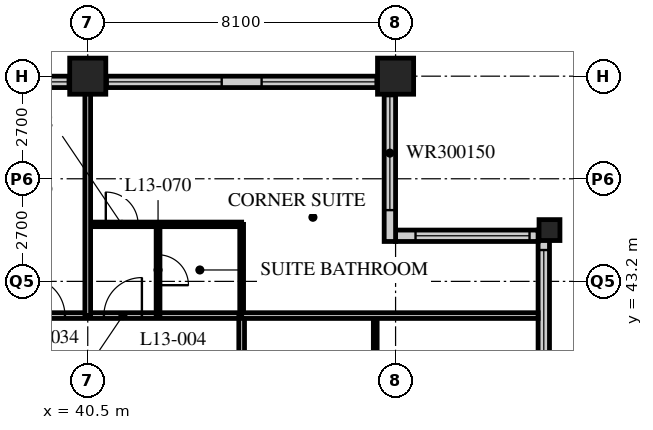
"""IFC4 building model, lengths in metres.
Left out: names, types, materials, properties, quantities, classifications, styles, units other than length and angle.
Written with IfcOpenShell. Run it as: python <this file> out.ifc"""

import sys

from ifc_helpers import new_model, si_unit, direction, frame, frame_2d, origin, origin_2d, place, context, subcontext, project, spatial, rectangle, hollow_rectangle, extrude, element, fill, save


model = new_model("IFC4")
c1 = context("Model", 3, precision=1e-05, world=origin(), true_north=direction((0.0, 1.0)))
c2 = subcontext(c1, "Body", "Model", "MODEL_VIEW")
j1 = project(units=[si_unit("LENGTHUNIT", "METRE"), si_unit("PLANEANGLEUNIT", "RADIAN")], contexts=[c1])
p1 = place(None, origin())
s1 = spatial("IfcSite", under=j1, at=p1, CompositionType="ELEMENT")
p2 = place(p1, origin())
s2 = spatial("IfcBuilding", under=s1, at=p2, CompositionType="ELEMENT")
p3 = place(p2, frame((0.0, 0.0, 56.8)))
s3 = spatial("IfcBuildingStorey", under=s2, at=p3, CompositionType="ELEMENT", Elevation=56.8)
for number, where, z_axis, x_axis in (
    (1, (40.5, 48.6, 0.0), (0.0, 0.0, 1.0), (1.0, 0.0, 0.0)),
    (2, (48.6, 48.6, 0.0), (0.0, 0.0, 1.0), (1.0, 0.0, 0.0)),
):
    element("IfcColumn", number, at=place(p3, frame(where, z_axis=z_axis, x_axis=x_axis)), inside=s3, PredefinedType="COLUMN", context=c2, shape_type="SweptSolid", body=[
        extrude(hollow_rectangle(XDim=0.95, YDim=0.95, WallThickness=0.095, at=origin_2d()), origin(), (0.0, 0.0, 1.0), 3.4),
    ])
p4 = place(p3, frame((52.65, 44.55, 0.0), z_axis=(0.0, 0.0, 1.0), x_axis=(1.0, 0.0, 0.0)))
e3 = element("IfcColumn", 3, at=p4, inside=s3, PredefinedType="COLUMN", context=c2, shape_type="SweptSolid", body=[
    extrude(hollow_rectangle(XDim=0.55, YDim=0.55, WallThickness=0.05, at=origin_2d()), origin(), (0.0, 0.0, 1.0), 3.4),
])
p5 = place(p3, frame((52.5, 40.2, 0.0), z_axis=(0.0, 0.0, 1.0), x_axis=(0.0, 1.0, 0.0)))
e4 = element("IfcWall", 4, at=p5, inside=s3, PredefinedType="SOLIDWALL", context=c2, shape_type="SweptSolid", body=[
    extrude(rectangle(XDim=4.35, YDim=0.3, at=frame_2d((2.175, 0.0))), origin(), (0.0, 0.0, 1.0), 3.19),
])
p6 = place(p5, frame((0.825, 0.0, 0.9)))
e5 = element("IfcOpeningElement", 5, at=p6, cuts=e4, PredefinedType="OPENING", context=c2, shape_type="SweptSolid", body=[
    extrude(rectangle(XDim=3.0, YDim=1.5, at=frame_2d((1.5, 0.75))), frame((0.0, 0.16, 0.0), z_axis=(0.0, -1.0, 0.0), x_axis=(1.0, 0.0, 0.0)), (0.0, 0.0, 1.0), 0.32),
])
p7 = place(p3, frame((52.35, 44.4, 0.0), z_axis=(0.0, 0.0, 1.0), x_axis=(-1.0, 0.0, 0.0)))
e6 = element("IfcWall", 6, at=p7, inside=s3, PredefinedType="SOLIDWALL", context=c2, shape_type="SweptSolid", body=[
    extrude(rectangle(XDim=3.75, YDim=0.3, at=frame_2d((1.875, 0.0))), origin(), (0.0, 0.0, 1.0), 3.19),
])
p8 = place(p7, frame((0.225, 0.0, 0.9)))
e7 = element("IfcOpeningElement", 7, at=p8, cuts=e6, PredefinedType="OPENING", context=c2, shape_type="SweptSolid", body=[
    extrude(rectangle(XDim=3.0, YDim=1.5, at=frame_2d((1.5, 0.75))), frame((0.0, 0.16, 0.0), z_axis=(0.0, -1.0, 0.0), x_axis=(1.0, 0.0, 0.0)), (0.0, 0.0, 1.0), 0.32),
])
p9 = place(p3, frame((48.45, 44.25, 0.0), z_axis=(0.0, 0.0, 1.0), x_axis=(0.0, 1.0, 0.0)))
e8 = element("IfcWall", 8, at=p9, inside=s3, PredefinedType="SOLIDWALL", context=c2, shape_type="SweptSolid", body=[
    extrude(rectangle(XDim=4.35, YDim=0.3, at=frame_2d((2.175, 0.0))), origin(), (0.0, 0.0, 1.0), 3.19),
])
p10 = place(p9, frame((0.825, 0.0, 0.9)))
e9 = element("IfcOpeningElement", 9, at=p10, cuts=e8, PredefinedType="OPENING", context=c2, shape_type="SweptSolid", body=[
    extrude(rectangle(XDim=3.0, YDim=1.5, at=frame_2d((1.5, 0.75))), frame((0.0, 0.16, 0.0), z_axis=(0.0, -1.0, 0.0), x_axis=(1.0, 0.0, 0.0)), (0.0, 0.0, 1.0), 0.32),
])
p11 = place(p3, frame((48.3, 48.45, 0.0), z_axis=(0.0, 0.0, 1.0), x_axis=(-1.0, 0.0, 0.0)))
e10 = element("IfcWall", 10, at=p11, inside=s3, PredefinedType="SOLIDWALL", context=c2, shape_type="SweptSolid", body=[
    extrude(rectangle(XDim=40.2, YDim=0.3, at=frame_2d((20.1, 0.0))), origin(), (0.0, 0.0, 1.0), 3.19),
])
p12 = place(p11, frame((0.225, 0.0, 0.9)))
e11 = element("IfcOpeningElement", 11, at=p12, cuts=e10, PredefinedType="OPENING", context=c2, shape_type="SweptSolid", body=[
    extrude(rectangle(XDim=3.0, YDim=2.0, at=frame_2d((1.5, 1.0))), frame((0.0, 0.16, 0.0), z_axis=(0.0, -1.0, 0.0), x_axis=(1.0, 0.0, 0.0)), (0.0, 0.0, 1.0), 0.32),
])
p13 = place(p11, frame((4.275, 0.0, 0.9)))
e12 = element("IfcOpeningElement", 12, at=p13, cuts=e10, PredefinedType="OPENING", context=c2, shape_type="SweptSolid", body=[
    extrude(rectangle(XDim=3.0, YDim=2.0, at=frame_2d((1.5, 1.0))), frame((0.0, 0.16, 0.0), z_axis=(0.0, -1.0, 0.0), x_axis=(1.0, 0.0, 0.0)), (0.0, 0.0, 1.0), 0.32),
])
p14 = place(p11, frame((8.325, 0.0, 0.9)))
e13 = element("IfcOpeningElement", 13, at=p14, cuts=e10, PredefinedType="OPENING", context=c2, shape_type="SweptSolid", body=[
    extrude(rectangle(XDim=3.0, YDim=2.0, at=frame_2d((1.5, 1.0))), frame((0.0, 0.16, 0.0), z_axis=(0.0, -1.0, 0.0), x_axis=(1.0, 0.0, 0.0)), (0.0, 0.0, 1.0), 0.32),
])
p15 = place(p11, frame((12.375, 0.0, 0.9)))
e14 = element("IfcOpeningElement", 14, at=p15, cuts=e10, PredefinedType="OPENING", context=c2, shape_type="SweptSolid", body=[
    extrude(rectangle(XDim=3.0, YDim=2.0, at=frame_2d((1.5, 1.0))), frame((0.0, 0.16, 0.0), z_axis=(0.0, -1.0, 0.0), x_axis=(1.0, 0.0, 0.0)), (0.0, 0.0, 1.0), 0.32),
])
p16 = place(p11, frame((16.425, 0.0, 0.9)))
e15 = element("IfcOpeningElement", 15, at=p16, cuts=e10, PredefinedType="OPENING", context=c2, shape_type="SweptSolid", body=[
    extrude(rectangle(XDim=3.0, YDim=2.0, at=frame_2d((1.5, 1.0))), frame((0.0, 0.16, 0.0), z_axis=(0.0, -1.0, 0.0), x_axis=(1.0, 0.0, 0.0)), (0.0, 0.0, 1.0), 0.32),
])
p17 = place(p11, frame((20.475, 0.0, 0.9)))
e16 = element("IfcOpeningElement", 16, at=p17, cuts=e10, PredefinedType="OPENING", context=c2, shape_type="SweptSolid", body=[
    extrude(rectangle(XDim=3.0, YDim=2.0, at=frame_2d((1.5, 1.0))), frame((0.0, 0.16, 0.0), z_axis=(0.0, -1.0, 0.0), x_axis=(1.0, 0.0, 0.0)), (0.0, 0.0, 1.0), 0.32),
])
p18 = place(p11, frame((24.525, 0.0, 0.9)))
e17 = element("IfcOpeningElement", 17, at=p18, cuts=e10, PredefinedType="OPENING", context=c2, shape_type="SweptSolid", body=[
    extrude(rectangle(XDim=3.0, YDim=2.0, at=frame_2d((1.5, 1.0))), frame((0.0, 0.16, 0.0), z_axis=(0.0, -1.0, 0.0), x_axis=(1.0, 0.0, 0.0)), (0.0, 0.0, 1.0), 0.32),
])
p19 = place(p11, frame((28.575, 0.0, 0.9)))
e18 = element("IfcOpeningElement", 18, at=p19, cuts=e10, PredefinedType="OPENING", context=c2, shape_type="SweptSolid", body=[
    extrude(rectangle(XDim=3.0, YDim=2.0, at=frame_2d((1.5, 1.0))), frame((0.0, 0.16, 0.0), z_axis=(0.0, -1.0, 0.0), x_axis=(1.0, 0.0, 0.0)), (0.0, 0.0, 1.0), 0.32),
])
p20 = place(p11, frame((32.625, 0.0, 0.9)))
e19 = element("IfcOpeningElement", 19, at=p20, cuts=e10, PredefinedType="OPENING", context=c2, shape_type="SweptSolid", body=[
    extrude(rectangle(XDim=3.0, YDim=2.0, at=frame_2d((1.5, 1.0))), frame((0.0, 0.16, 0.0), z_axis=(0.0, -1.0, 0.0), x_axis=(1.0, 0.0, 0.0)), (0.0, 0.0, 1.0), 0.32),
])
p21 = place(p11, frame((36.675, 0.0, 0.9)))
e20 = element("IfcOpeningElement", 20, at=p21, cuts=e10, PredefinedType="OPENING", context=c2, shape_type="SweptSolid", body=[
    extrude(rectangle(XDim=3.0, YDim=2.0, at=frame_2d((1.5, 1.0))), frame((0.0, 0.16, 0.0), z_axis=(0.0, -1.0, 0.0), x_axis=(1.0, 0.0, 0.0)), (0.0, 0.0, 1.0), 0.32),
])
p22 = place(p3, frame((12.15, 42.3, 0.0), z_axis=(0.0, 0.0, 1.0), x_axis=(1.0, 0.0, 0.0)))
e21 = element("IfcWall", 21, at=p22, inside=s3, PredefinedType="PARTITIONING", context=c2, shape_type="SweptSolid", body=[
    extrude(rectangle(XDim=32.4, YDim=0.15, at=frame_2d((16.2, 0.0))), origin(), (0.0, 0.0, 1.0), 3.19),
])
p23 = place(p22, frame((6.5, 0.0, 0.0)))
e22 = element("IfcOpeningElement", 22, at=p23, cuts=e21, PredefinedType="OPENING", context=c2, shape_type="SweptSolid", body=[
    extrude(rectangle(XDim=1.0, YDim=2.1, at=frame_2d((0.5, 1.05))), frame((0.0, 0.085, 0.0), z_axis=(0.0, -1.0, 0.0), x_axis=(1.0, 0.0, 0.0)), (0.0, 0.0, 1.0), 0.17),
])
p24 = place(p22, frame((10.55, 0.0, 0.0)))
e23 = element("IfcOpeningElement", 23, at=p24, cuts=e21, PredefinedType="OPENING", context=c2, shape_type="SweptSolid", body=[
    extrude(rectangle(XDim=1.0, YDim=2.1, at=frame_2d((0.5, 1.05))), frame((0.0, 0.085, 0.0), z_axis=(0.0, -1.0, 0.0), x_axis=(1.0, 0.0, 0.0)), (0.0, 0.0, 1.0), 0.17),
])
p25 = place(p22, frame((14.6, 0.0, 0.0)))
e24 = element("IfcOpeningElement", 24, at=p25, cuts=e21, PredefinedType="OPENING", context=c2, shape_type="SweptSolid", body=[
    extrude(rectangle(XDim=1.0, YDim=2.1, at=frame_2d((0.5, 1.05))), frame((0.0, 0.085, 0.0), z_axis=(0.0, -1.0, 0.0), x_axis=(1.0, 0.0, 0.0)), (0.0, 0.0, 1.0), 0.17),
])
p26 = place(p22, frame((18.65, 0.0, 0.0)))
e25 = element("IfcOpeningElement", 25, at=p26, cuts=e21, PredefinedType="OPENING", context=c2, shape_type="SweptSolid", body=[
    extrude(rectangle(XDim=1.0, YDim=2.1, at=frame_2d((0.5, 1.05))), frame((0.0, 0.085, 0.0), z_axis=(0.0, -1.0, 0.0), x_axis=(1.0, 0.0, 0.0)), (0.0, 0.0, 1.0), 0.17),
])
p27 = place(p22, frame((22.7, 0.0, 0.0)))
e26 = element("IfcOpeningElement", 26, at=p27, cuts=e21, PredefinedType="OPENING", context=c2, shape_type="SweptSolid", body=[
    extrude(rectangle(XDim=1.0, YDim=2.1, at=frame_2d((0.5, 1.05))), frame((0.0, 0.085, 0.0), z_axis=(0.0, -1.0, 0.0), x_axis=(1.0, 0.0, 0.0)), (0.0, 0.0, 1.0), 0.17),
])
p28 = place(p22, frame((26.75, 0.0, 0.0)))
e27 = element("IfcOpeningElement", 27, at=p28, cuts=e21, PredefinedType="OPENING", context=c2, shape_type="SweptSolid", body=[
    extrude(rectangle(XDim=1.0, YDim=2.1, at=frame_2d((0.5, 1.05))), frame((0.0, 0.085, 0.0), z_axis=(0.0, -1.0, 0.0), x_axis=(1.0, 0.0, 0.0)), (0.0, 0.0, 1.0), 0.17),
])
p29 = place(p22, frame((28.775, 0.0, 0.0)))
e28 = element("IfcOpeningElement", 28, at=p29, cuts=e21, PredefinedType="OPENING", context=c2, shape_type="SweptSolid", body=[
    extrude(rectangle(XDim=1.0, YDim=2.1, at=frame_2d((0.5, 1.05))), frame((0.0, 0.085, 0.0), z_axis=(0.0, -1.0, 0.0), x_axis=(1.0, 0.0, 0.0)), (0.0, 0.0, 1.0), 0.17),
])
p30 = place(p22, frame((2.625, 0.0, 0.0)))
e29 = element("IfcOpeningElement", 29, at=p30, cuts=e21, PredefinedType="OPENING", context=c2, shape_type="SweptSolid", body=[
    extrude(rectangle(XDim=1.0, YDim=2.1, at=frame_2d((0.5, 1.05))), frame((0.0, 0.085, 0.0), z_axis=(0.0, -1.0, 0.0), x_axis=(1.0, 0.0, 0.0)), (0.0, 0.0, 1.0), 0.17),
])
p31 = place(p3, frame((44.55, 12.15, 0.0), z_axis=(0.0, 0.0, 1.0), x_axis=(0.0, 1.0, 0.0)))
e30 = element("IfcWall", 30, at=p31, inside=s3, PredefinedType="PARTITIONING", context=c2, shape_type="SweptSolid", body=[
    extrude(rectangle(XDim=30.15, YDim=0.15, at=frame_2d((15.075, 0.0))), origin(), (0.0, 0.0, 1.0), 3.19),
])
p32 = place(p31, frame((2.75, 0.0, 0.0)))
e31 = element("IfcOpeningElement", 31, at=p32, cuts=e30, PredefinedType="OPENING", context=c2, shape_type="SweptSolid", body=[
    extrude(rectangle(XDim=1.0, YDim=2.1, at=frame_2d((0.5, 1.05))), frame((0.0, 0.085, 0.0), z_axis=(0.0, -1.0, 0.0), x_axis=(1.0, 0.0, 0.0)), (0.0, 0.0, 1.0), 0.17),
])
p33 = place(p31, frame((6.5, 0.0, 0.0)))
e32 = element("IfcOpeningElement", 32, at=p33, cuts=e30, PredefinedType="OPENING", context=c2, shape_type="SweptSolid", body=[
    extrude(rectangle(XDim=1.0, YDim=2.1, at=frame_2d((0.5, 1.05))), frame((0.0, 0.085, 0.0), z_axis=(0.0, -1.0, 0.0), x_axis=(1.0, 0.0, 0.0)), (0.0, 0.0, 1.0), 0.17),
])
p34 = place(p31, frame((10.55, 0.0, 0.0)))
e33 = element("IfcOpeningElement", 33, at=p34, cuts=e30, PredefinedType="OPENING", context=c2, shape_type="SweptSolid", body=[
    extrude(rectangle(XDim=1.0, YDim=2.1, at=frame_2d((0.5, 1.05))), frame((0.0, 0.085, 0.0), z_axis=(0.0, -1.0, 0.0), x_axis=(1.0, 0.0, 0.0)), (0.0, 0.0, 1.0), 0.17),
])
p35 = place(p31, frame((14.6, 0.0, 0.0)))
e34 = element("IfcOpeningElement", 34, at=p35, cuts=e30, PredefinedType="OPENING", context=c2, shape_type="SweptSolid", body=[
    extrude(rectangle(XDim=1.0, YDim=2.1, at=frame_2d((0.5, 1.05))), frame((0.0, 0.085, 0.0), z_axis=(0.0, -1.0, 0.0), x_axis=(1.0, 0.0, 0.0)), (0.0, 0.0, 1.0), 0.17),
])
p36 = place(p31, frame((18.65, 0.0, 0.0)))
e35 = element("IfcOpeningElement", 35, at=p36, cuts=e30, PredefinedType="OPENING", context=c2, shape_type="SweptSolid", body=[
    extrude(rectangle(XDim=1.0, YDim=2.1, at=frame_2d((0.5, 1.05))), frame((0.0, 0.085, 0.0), z_axis=(0.0, -1.0, 0.0), x_axis=(1.0, 0.0, 0.0)), (0.0, 0.0, 1.0), 0.17),
])
p37 = place(p31, frame((22.7, 0.0, 0.0)))
e36 = element("IfcOpeningElement", 36, at=p37, cuts=e30, PredefinedType="OPENING", context=c2, shape_type="SweptSolid", body=[
    extrude(rectangle(XDim=1.0, YDim=2.1, at=frame_2d((0.5, 1.05))), frame((0.0, 0.085, 0.0), z_axis=(0.0, -1.0, 0.0), x_axis=(1.0, 0.0, 0.0)), (0.0, 0.0, 1.0), 0.17),
])
p38 = place(p31, frame((26.7, 0.0, 0.0)))
e37 = element("IfcOpeningElement", 37, at=p38, cuts=e30, PredefinedType="OPENING", context=c2, shape_type="SweptSolid", body=[
    extrude(rectangle(XDim=1.0, YDim=2.1, at=frame_2d((0.5, 1.05))), frame((0.0, 0.085, 0.0), z_axis=(0.0, -1.0, 0.0), x_axis=(1.0, 0.0, 0.0)), (0.0, 0.0, 1.0), 0.17),
])
p39 = place(p3, frame((48.065, 40.0, 0.0), z_axis=(0.0, 0.0, 1.0), x_axis=(0.0, 1.0, 0.0)))
e38 = element("IfcWall", 38, at=p39, inside=s3, PredefinedType="PARTITIONING", context=c2, shape_type="SweptSolid", body=[
    extrude(rectangle(XDim=2.3, YDim=0.1, at=frame_2d((1.15, 0.0))), origin(), (0.0, 0.0, 1.0), 3.19),
])
p40 = place(p3, frame((40.5, 44.7, 0.0), z_axis=(0.0, 0.0, 1.0), x_axis=(1.0, 0.0, 0.0)))
e39 = element("IfcWall", 39, at=p40, inside=s3, PredefinedType="PARTITIONING", context=c2, shape_type="SweptSolid", body=[
    extrude(rectangle(XDim=4.05, YDim=0.12, at=frame_2d((2.025, 0.0))), origin(), (0.0, 0.0, 1.0), 3.19),
])
p41 = place(p40, frame((0.475, 0.0, 0.0)))
e40 = element("IfcOpeningElement", 40, at=p41, cuts=e39, PredefinedType="OPENING", context=c2, shape_type="SweptSolid", body=[
    extrude(rectangle(XDim=0.85, YDim=2.1, at=frame_2d((0.425, 1.05))), frame((0.0, 0.07, 0.0), z_axis=(0.0, -1.0, 0.0), x_axis=(1.0, 0.0, 0.0)), (0.0, 0.0, 1.0), 0.14),
])
p42 = place(p3, frame((42.35, 42.3, 0.0), z_axis=(0.0, 0.0, 1.0), x_axis=(0.0, 1.0, 0.0)))
e41 = element("IfcWall", 41, at=p42, inside=s3, PredefinedType="PARTITIONING", context=c2, shape_type="SweptSolid", body=[
    extrude(rectangle(XDim=2.4, YDim=0.1, at=frame_2d((1.2, 0.0))), origin(), (0.0, 0.0, 1.0), 3.19),
])
p43 = place(p42, frame((0.8, 0.0, 0.0)))
e42 = element("IfcOpeningElement", 42, at=p43, cuts=e41, PredefinedType="OPENING", context=c2, shape_type="SweptSolid", body=[
    extrude(rectangle(XDim=0.8, YDim=2.1, at=frame_2d((0.4, 1.05))), frame((0.0, 0.06, 0.0), z_axis=(0.0, -1.0, 0.0), x_axis=(1.0, 0.0, 0.0)), (0.0, 0.0, 1.0), 0.12),
])
p44 = place(p3, frame((44.55, 42.3, 0.0), z_axis=(0.0, 0.0, 1.0), x_axis=(0.0, 1.0, 0.0)))
e43 = element("IfcWall", 43, at=p44, inside=s3, PredefinedType="PARTITIONING", context=c2, shape_type="SweptSolid", body=[
    extrude(rectangle(XDim=2.4, YDim=0.1, at=frame_2d((1.2, 0.0))), origin(), (0.0, 0.0, 1.0), 3.19),
])
p45 = place(p3, frame((44.55, 42.3, 0.0), z_axis=(0.0, 0.0, 1.0), x_axis=(1.0, 0.0, 0.0)))
e44 = element("IfcWall", 44, at=p45, inside=s3, PredefinedType="PARTITIONING", context=c2, shape_type="SweptSolid", body=[
    extrude(rectangle(XDim=7.8, YDim=0.15, at=frame_2d((3.9, 0.0))), origin(), (0.0, 0.0, 1.0), 3.19),
])
p46 = place(p3, frame((40.5, 42.3, 0.0), z_axis=(0.0, 0.0, 1.0), x_axis=(0.0, 1.0, 0.0)))
e45 = element("IfcWall", 45, at=p46, inside=s3, PredefinedType="PARTITIONING", context=c2, shape_type="SweptSolid", body=[
    extrude(rectangle(XDim=6.0, YDim=0.15, at=frame_2d((3.0, 0.0))), origin(), (0.0, 0.0, 1.0), 2.578),
])
p47 = place(p6, origin())
e46 = element("IfcWindow", 46, at=p47, inside=s3, PartitioningType="SINGLE_PANEL", PredefinedType="WINDOW", context=c2, shape_type="SweptSolid", body=[
    extrude(rectangle(XDim=3.0, YDim=1.5, at=frame_2d((1.5, 0.75))), frame((0.0, 0.03, 0.0), z_axis=(0.0, -1.0, 0.0), x_axis=(1.0, 0.0, 0.0)), (0.0, 0.0, 1.0), 0.06),
])
fill(e5, e46)
p48 = place(p8, origin())
e47 = element("IfcWindow", 47, at=p48, inside=s3, PartitioningType="SINGLE_PANEL", PredefinedType="WINDOW", context=c2, shape_type="SweptSolid", body=[
    extrude(rectangle(XDim=3.0, YDim=1.5, at=frame_2d((1.5, 0.75))), frame((0.0, 0.03, 0.0), z_axis=(0.0, -1.0, 0.0), x_axis=(1.0, 0.0, 0.0)), (0.0, 0.0, 1.0), 0.06),
])
fill(e7, e47)
p49 = place(p10, origin())
e48 = element("IfcWindow", 48, at=p49, inside=s3, PartitioningType="SINGLE_PANEL", PredefinedType="WINDOW", context=c2, shape_type="SweptSolid", body=[
    extrude(rectangle(XDim=3.0, YDim=1.5, at=frame_2d((1.5, 0.75))), frame((0.0, 0.03, 0.0), z_axis=(0.0, -1.0, 0.0), x_axis=(1.0, 0.0, 0.0)), (0.0, 0.0, 1.0), 0.06),
])
fill(e9, e48)
p50 = place(p12, origin())
e49 = element("IfcWindow", 49, at=p50, inside=s3, PartitioningType="SINGLE_PANEL", PredefinedType="WINDOW", context=c2, shape_type="SweptSolid", body=[
    extrude(rectangle(XDim=3.0, YDim=2.0, at=frame_2d((1.5, 1.0))), frame((0.0, 0.03, 0.0), z_axis=(0.0, -1.0, 0.0), x_axis=(1.0, 0.0, 0.0)), (0.0, 0.0, 1.0), 0.06),
])
fill(e11, e49)
p51 = place(p13, origin())
e50 = element("IfcWindow", 50, at=p51, inside=s3, PartitioningType="SINGLE_PANEL", PredefinedType="WINDOW", context=c2, shape_type="SweptSolid", body=[
    extrude(rectangle(XDim=3.0, YDim=2.0, at=frame_2d((1.5, 1.0))), frame((0.0, 0.03, 0.0), z_axis=(0.0, -1.0, 0.0), x_axis=(1.0, 0.0, 0.0)), (0.0, 0.0, 1.0), 0.06),
])
fill(e12, e50)
p52 = place(p14, origin())
e51 = element("IfcWindow", 51, at=p52, inside=s3, PartitioningType="SINGLE_PANEL", PredefinedType="WINDOW", context=c2, shape_type="SweptSolid", body=[
    extrude(rectangle(XDim=3.0, YDim=2.0, at=frame_2d((1.5, 1.0))), frame((0.0, 0.03, 0.0), z_axis=(0.0, -1.0, 0.0), x_axis=(1.0, 0.0, 0.0)), (0.0, 0.0, 1.0), 0.06),
])
fill(e13, e51)
p53 = place(p28, origin())
e52 = element("IfcDoor", 52, at=p53, inside=s3, OperationType="SINGLE_SWING_LEFT", PredefinedType="DOOR", context=c2, shape_type="SweptSolid", body=[
    extrude(rectangle(XDim=1.0, YDim=2.1, at=frame_2d((0.5, 1.05))), frame((0.0, 0.025, 0.0), z_axis=(0.0, -1.0, 0.0), x_axis=(1.0, 0.0, 0.0)), (0.0, 0.0, 1.0), 0.05),
])
fill(e27, e52)
p54 = place(p43, origin())
e53 = element("IfcDoor", 53, at=p54, inside=s3, OperationType="SINGLE_SWING_RIGHT", PredefinedType="DOOR", context=c2, shape_type="SweptSolid", body=[
    extrude(rectangle(XDim=0.8, YDim=2.1, at=frame_2d((0.4, 1.05))), frame((0.0, 0.025, 0.0), z_axis=(0.0, -1.0, 0.0), x_axis=(1.0, 0.0, 0.0)), (0.0, 0.0, 1.0), 0.05),
])
fill(e42, e53)
p55 = place(p29, origin())
e54 = element("IfcDoor", 54, at=p55, inside=s3, OperationType="SINGLE_SWING_RIGHT", PredefinedType="DOOR", context=c2, shape_type="SweptSolid", body=[
    extrude(rectangle(XDim=1.0, YDim=2.1, at=frame_2d((0.5, 1.05))), frame((0.0, 0.025, 0.0), z_axis=(0.0, -1.0, 0.0), x_axis=(1.0, 0.0, 0.0)), (0.0, 0.0, 1.0), 0.05),
])
fill(e28, e54)
p56 = place(p41, origin())
e55 = element("IfcDoor", 55, at=p56, inside=s3, OperationType="SINGLE_SWING_LEFT", PredefinedType="DOOR", context=c2, shape_type="SweptSolid", body=[
    extrude(rectangle(XDim=0.85, YDim=2.1, at=frame_2d((0.425, 1.05))), frame((0.0, 0.025, 0.0), z_axis=(0.0, -1.0, 0.0), x_axis=(1.0, 0.0, 0.0)), (0.0, 0.0, 1.0), 0.05),
])
fill(e40, e55)
save(model, sys.argv[1])
